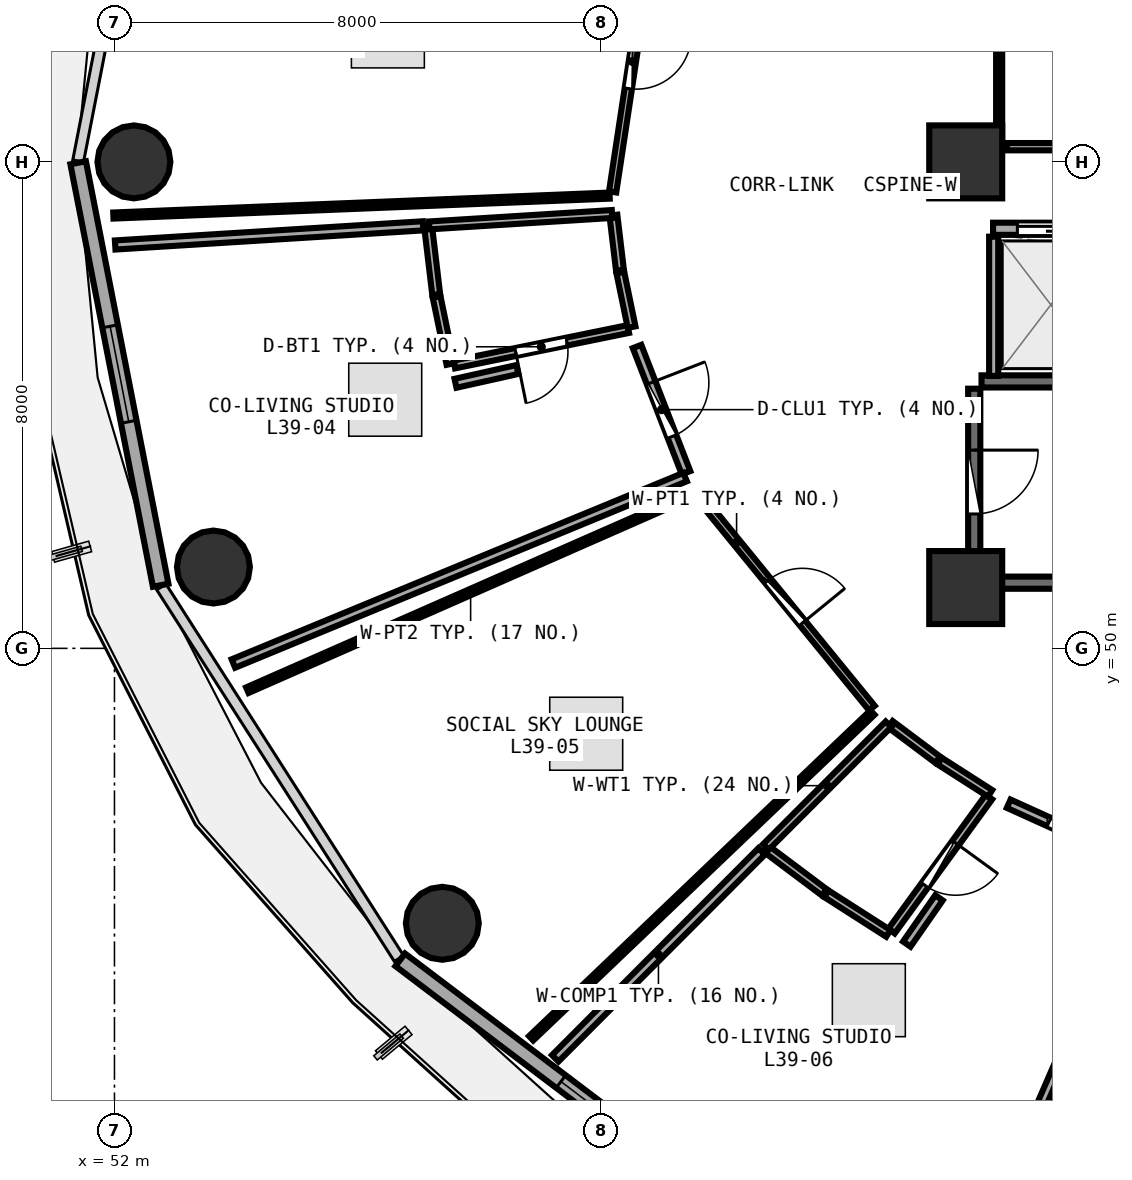
"""IFC4 building model, lengths in metres.
Left out: names, types, materials, properties, quantities, classifications, styles, units other than length and angle.
Written with IfcOpenShell. Run it as: python <this file> out.ifc"""

import sys

from ifc_helpers import new_model, si_unit, direction, frame, frame_2d, origin, origin_2d, place, context, subcontext, project, spatial, rectangle, circle, extrude, element, fill, save


model = new_model("IFC4")
c1 = context("Model", 3, precision=1e-05, world=origin(), true_north=direction((0.0, 1.0)))
c2 = subcontext(c1, "Body", "Model", "MODEL_VIEW")
j1 = project(units=[si_unit("LENGTHUNIT", "METRE"), si_unit("PLANEANGLEUNIT", "RADIAN")], contexts=[c1])
p1 = place(None, origin())
s1 = spatial("IfcSite", under=j1, at=p1, CompositionType="ELEMENT")
p2 = place(p1, origin())
s2 = spatial("IfcBuilding", under=s1, at=p2, CompositionType="ELEMENT")
p3 = place(p2, frame((0.0, 0.0, 154.35)))
s3 = spatial("IfcBuildingStorey", under=s2, at=p3, CompositionType="ELEMENT", Elevation=154.35)
for number, where, z_axis, x_axis in (
    (1, (66.0, 51.0, 0.0), (0.0, 0.0, 1.0), (1.0, 0.0, 0.0)),
    (2, (66.0, 58.0, 0.0), (0.0, 0.0, 1.0), (1.0, 0.0, 0.0)),
):
    element("IfcColumn", number, at=place(p3, frame(where, z_axis=z_axis, x_axis=x_axis)), inside=s3, PredefinedType="PILASTER", context=c2, shape_type="SweptSolid", body=[
        extrude(rectangle(XDim=1.2, YDim=1.2, at=origin_2d()), origin(), (0.0, 0.0, 1.0), 3.75),
    ])
for number, where, z_axis, x_axis in (
    (3, (52.32, 58.0, 0.0), (0.0, 0.0, 1.0), (1.0, 0.0, 0.0)),
    (4, (53.627, 51.337, 0.0), (0.0, 0.0, 1.0), (1.0, 0.0, 0.0)),
    (5, (57.392, 45.479, 0.0), (0.0, 0.0, 1.0), (1.0, 0.0, 0.0)),
):
    element("IfcColumn", number, at=place(p3, frame(where, z_axis=z_axis, x_axis=x_axis)), inside=s3, PredefinedType="COLUMN", context=c2, shape_type="SweptSolid", body=[
        extrude(circle(Radius=0.6, at=origin_2d()), origin(), (0.0, 0.0, 1.0), 3.75),
    ])
p4 = place(p3, frame((51.403, 57.985, 0.0), z_axis=(0.0, 0.0, 1.0), x_axis=(0.191716984769, -0.981450252306, 0.0)))
e6 = element("IfcWall", 6, at=p4, inside=s3, PredefinedType="SOLIDWALL", context=c2, shape_type="SweptSolid", body=[
    extrude(rectangle(XDim=7.079, YDim=0.26, at=frame_2d((3.54, 0.0))), origin(), (0.0, 0.0, 1.0), 3.475),
])
p5 = place(p4, frame((2.74, 0.0, 0.85)))
e7 = element("IfcOpeningElement", 7, at=p5, cuts=e6, PredefinedType="OPENING", context=c2, shape_type="SweptSolid", body=[
    extrude(rectangle(XDim=1.6, YDim=1.45, at=frame_2d((0.8, 0.725))), frame((0.0, 0.14, 0.0), z_axis=(0.0, -1.0, 0.0), x_axis=(1.0, 0.0, 0.0)), (0.0, 0.0, 1.0), 0.28),
])
p6 = place(p3, frame((56.699, 44.878, 0.0), z_axis=(0.0, 0.0, 1.0), x_axis=(0.797163719609, -0.603763202042, 0.0)))
e8 = element("IfcWall", 8, at=p6, inside=s3, PredefinedType="SOLIDWALL", context=c2, shape_type="SweptSolid", body=[
    extrude(rectangle(XDim=7.512, YDim=0.26, at=frame_2d((3.756, 0.0))), origin(), (0.0, 0.0, 1.0), 3.475),
])
p7 = place(p6, frame((3.316, 0.0, 0.85)))
e9 = element("IfcOpeningElement", 9, at=p7, cuts=e8, PredefinedType="OPENING", context=c2, shape_type="SweptSolid", body=[
    extrude(rectangle(XDim=1.6, YDim=1.45, at=frame_2d((0.8, 0.725))), frame((0.0, 0.14, 0.0), z_axis=(0.0, -1.0, 0.0), x_axis=(1.0, 0.0, 0.0)), (0.0, 0.0, 1.0), 0.28),
])
for number, where, z_axis, x_axis in (
    (10, (66.26, 51.08, 0.0), (0.0, 0.0, 1.0), (1.0, 0.0, 0.0)),
    (11, (73.42, 54.39, 0.0), (0.0, 0.0, 1.0), (-1.0, 0.0, 0.0)),
):
    element("IfcWall", number, at=place(p3, frame(where, z_axis=z_axis, x_axis=x_axis)), inside=s3, PredefinedType="SHEAR", context=c2, shape_type="SweptSolid", body=[
        extrude(rectangle(XDim=7.16, YDim=0.2, at=frame_2d((3.58, 0.0))), origin(), (0.0, 0.0, 1.0), 3.49),
    ])
p8 = place(p3, frame((66.14, 54.27, 0.0), z_axis=(0.0, 0.0, 1.0), x_axis=(0.0, -1.0, 0.0)))
e12 = element("IfcWall", 12, at=p8, inside=s3, PredefinedType="SHEAR", context=c2, shape_type="SweptSolid", body=[
    extrude(rectangle(XDim=3.07, YDim=0.2, at=frame_2d((1.535, 0.0))), origin(), (0.0, 0.0, 1.0), 3.49),
])
p9 = place(p8, frame((1.01, 0.0, 0.0)))
e13 = element("IfcOpeningElement", 13, at=p9, cuts=e12, PredefinedType="OPENING", context=c2, shape_type="SweptSolid", body=[
    extrude(rectangle(XDim=1.05, YDim=2.1, at=frame_2d((0.525, 1.05))), frame((0.0, 0.11, 0.0), z_axis=(0.0, -1.0, 0.0), x_axis=(1.0, 0.0, 0.0)), (0.0, 0.0, 1.0), 0.22),
])
p10 = place(p3, frame((66.45, 56.9, 0.0), z_axis=(0.0, 0.0, 1.0), x_axis=(1.0, 0.0, 0.0)))
e14 = element("IfcWall", 14, at=p10, inside=s3, PredefinedType="SOLIDWALL", context=c2, shape_type="SweptSolid", body=[
    extrude(rectangle(XDim=14.4, YDim=0.2, at=frame_2d((7.2, 0.0))), origin(), (0.0, 0.0, 1.0), 3.48),
])
p11 = place(p10, frame((0.4, 0.0, 0.0)))
e15 = element("IfcOpeningElement", 15, at=p11, cuts=e14, PredefinedType="OPENING", context=c2, shape_type="SweptSolid", body=[
    extrude(rectangle(XDim=1.1, YDim=2.1, at=frame_2d((0.55, 1.05))), frame((0.0, 0.11, 0.0), z_axis=(0.0, -1.0, 0.0), x_axis=(1.0, 0.0, 0.0)), (0.0, 0.0, 1.0), 0.22),
])
p12 = place(p10, frame((2.4, 0.0, 0.0)))
e16 = element("IfcOpeningElement", 16, at=p12, cuts=e14, PredefinedType="OPENING", context=c2, shape_type="SweptSolid", body=[
    extrude(rectangle(XDim=1.1, YDim=2.1, at=frame_2d((0.55, 1.05))), frame((0.0, 0.11, 0.0), z_axis=(0.0, -1.0, 0.0), x_axis=(1.0, 0.0, 0.0)), (0.0, 0.0, 1.0), 0.22),
])
p13 = place(p10, frame((4.4, 0.0, 0.0)))
e17 = element("IfcOpeningElement", 17, at=p13, cuts=e14, PredefinedType="OPENING", context=c2, shape_type="SweptSolid", body=[
    extrude(rectangle(XDim=1.1, YDim=2.1, at=frame_2d((0.55, 1.05))), frame((0.0, 0.11, 0.0), z_axis=(0.0, -1.0, 0.0), x_axis=(1.0, 0.0, 0.0)), (0.0, 0.0, 1.0), 0.22),
])
p14 = place(p3, frame((66.46, 54.48, 0.0), z_axis=(0.0, 0.0, 1.0), x_axis=(0.0, 1.0, 0.0)))
e18 = element("IfcWall", 18, at=p14, inside=s3, PredefinedType="PARTITIONING", context=c2, shape_type="SweptSolid", body=[
    extrude(rectangle(XDim=2.29, YDim=0.15, at=frame_2d((1.145, 0.0))), origin(), (0.0, 0.0, 1.0), 3.48),
])
p15 = place(p3, frame((66.675, 58.25, 0.0), z_axis=(0.0, 0.0, 1.0), x_axis=(1.0, 0.0, 0.0)))
e19 = element("IfcWall", 19, at=p15, inside=s3, PredefinedType="PARTITIONING", context=c2, shape_type="SweptSolid", body=[
    extrude(rectangle(XDim=5.715, YDim=0.12, at=frame_2d((2.857, 0.0))), origin(), (0.0, 0.0, 1.0), 3.48),
])
p16 = place(p15, frame((2.407, 0.0, 0.0)))
e20 = element("IfcOpeningElement", 20, at=p16, cuts=e19, PredefinedType="OPENING", context=c2, shape_type="SweptSolid", body=[
    extrude(rectangle(XDim=0.9, YDim=2.08, at=frame_2d((0.45, 1.04))), frame((0.0, 0.07, 0.0), z_axis=(0.0, -1.0, 0.0), x_axis=(1.0, 0.0, 0.0)), (0.0, 0.0, 1.0), 0.14),
])
p17 = place(p3, frame((60.843, 61.796, 0.0), z_axis=(0.0, 0.0, 1.0), x_axis=(-0.149807046494, -0.988715251638, 0.0)))
e21 = element("IfcWall", 21, at=p17, inside=s3, PredefinedType="PARTITIONING", context=c2, shape_type="SweptSolid", body=[
    extrude(rectangle(XDim=4.338, YDim=0.12, at=frame_2d((2.169, 0.0))), origin(), (0.0, 0.0, 1.0), 2.975),
])
p18 = place(p17, frame((1.719, 0.0, 0.0)))
e22 = element("IfcOpeningElement", 22, at=p18, cuts=e21, PredefinedType="OPENING", context=c2, shape_type="SweptSolid", body=[
    extrude(rectangle(XDim=0.9, YDim=2.08, at=frame_2d((0.45, 1.04))), frame((0.0, 0.07, 0.0), z_axis=(0.0, -1.0, 0.0), x_axis=(1.0, 0.0, 0.0)), (0.0, 0.0, 1.0), 0.14),
])
p19 = place(p3, frame((60.45, 55.251, 0.0), z_axis=(0.0, 0.0, 1.0), x_axis=(-0.979866857251, -0.199652052484, 0.0)))
e23 = element("IfcWall", 23, at=p19, inside=s3, PredefinedType="PLUMBINGWALL", context=c2, shape_type="SweptSolid", body=[
    extrude(rectangle(XDim=2.92, YDim=0.13, at=frame_2d((1.46, 0.0))), origin(), (0.0, 0.0, 1.0), 3.175),
])
p20 = place(p19, frame((1.03, 0.0, 0.0)))
e24 = element("IfcOpeningElement", 24, at=p20, cuts=e23, PredefinedType="OPENING", context=c2, shape_type="SweptSolid", body=[
    extrude(rectangle(XDim=0.86, YDim=2.05, at=frame_2d((0.43, 1.025))), frame((0.0, 0.075, 0.0), z_axis=(0.0, -1.0, 0.0), x_axis=(1.0, 0.0, 0.0)), (0.0, 0.0, 1.0), 0.15),
])
p21 = place(p3, frame((60.595, 54.964, 0.0), z_axis=(0.0, 0.0, 1.0), x_axis=(0.361769005858, -0.932267765398, 0.0)))
e25 = element("IfcWall", 25, at=p21, inside=s3, PredefinedType="PARTITIONING", context=c2, shape_type="SweptSolid", body=[
    extrude(rectangle(XDim=2.227, YDim=0.15, at=frame_2d((1.114, 0.0))), origin(), (0.0, 0.0, 1.0), 3.235),
])
p22 = place(p21, frame((0.639, 0.0, 0.0)))
e26 = element("IfcOpeningElement", 26, at=p22, cuts=e25, PredefinedType="OPENING", context=c2, shape_type="SweptSolid", body=[
    extrude(rectangle(XDim=0.95, YDim=2.08, at=frame_2d((0.475, 1.04))), frame((0.0, 0.085, 0.0), z_axis=(0.0, -1.0, 0.0), x_axis=(1.0, 0.0, 0.0)), (0.0, 0.0, 1.0), 0.17),
])
p23 = place(p3, frame((61.604, 52.511, 0.0), z_axis=(0.0, 0.0, 1.0), x_axis=(0.632491819148, -0.77456703952, 0.0)))
e27 = element("IfcWall", 27, at=p23, inside=s3, PredefinedType="PARTITIONING", context=c2, shape_type="SweptSolid", body=[
    extrude(rectangle(XDim=4.511, YDim=0.12, at=frame_2d((2.255, 0.0))), origin(), (0.0, 0.0, 1.0), 2.975),
])
p24 = place(p23, frame((1.805, 0.0, 0.0)))
e28 = element("IfcOpeningElement", 28, at=p24, cuts=e27, PredefinedType="OPENING", context=c2, shape_type="SweptSolid", body=[
    extrude(rectangle(XDim=0.9, YDim=2.08, at=frame_2d((0.45, 1.04))), frame((0.0, 0.07, 0.0), z_axis=(0.0, -1.0, 0.0), x_axis=(1.0, 0.0, 0.0)), (0.0, 0.0, 1.0), 0.14),
])
p25 = place(p3, frame((66.383, 47.555, 0.0), z_axis=(0.0, 0.0, 1.0), x_axis=(-0.588001344837, -0.808859949849, 0.0)))
e29 = element("IfcWall", 29, at=p25, inside=s3, PredefinedType="PLUMBINGWALL", context=c2, shape_type="SweptSolid", body=[
    extrude(rectangle(XDim=2.727, YDim=0.13, at=frame_2d((1.364, 0.0))), origin(), (0.0, 0.0, 1.0), 3.235),
])
p26 = place(p25, frame((0.934, 0.0, 0.0)))
e30 = element("IfcOpeningElement", 30, at=p26, cuts=e29, PredefinedType="OPENING", context=c2, shape_type="SweptSolid", body=[
    extrude(rectangle(XDim=0.86, YDim=2.05, at=frame_2d((0.43, 1.025))), frame((0.0, 0.075, 0.0), z_axis=(0.0, -1.0, 0.0), x_axis=(1.0, 0.0, 0.0)), (0.0, 0.0, 1.0), 0.15),
])
p27 = place(p3, frame((66.707, 47.445, 0.0), z_axis=(0.0, 0.0, 1.0), x_axis=(0.910872904928, -0.412686989216, 0.0)))
e31 = element("IfcWall", 31, at=p27, inside=s3, PredefinedType="PARTITIONING", context=c2, shape_type="SweptSolid", body=[
    extrude(rectangle(XDim=2.407, YDim=0.15, at=frame_2d((1.204, 0.0))), origin(), (0.0, 0.0, 1.0), 3.235),
])
p28 = place(p27, frame((0.729, 0.0, 0.0)))
e32 = element("IfcOpeningElement", 32, at=p28, cuts=e31, PredefinedType="OPENING", context=c2, shape_type="SweptSolid", body=[
    extrude(rectangle(XDim=0.95, YDim=2.08, at=frame_2d((0.475, 1.04))), frame((0.0, 0.085, 0.0), z_axis=(0.0, -1.0, 0.0), x_axis=(1.0, 0.0, 0.0)), (0.0, 0.0, 1.0), 0.17),
])
p29 = place(p3, frame((66.55, 60.68, 0.0), z_axis=(0.0, 0.0, 1.0), x_axis=(0.0, -1.0, 0.0)))
e33 = element("IfcWall", 33, at=p29, inside=s3, PredefinedType="PARTITIONING", context=c2, shape_type="SweptSolid", body=[
    extrude(rectangle(XDim=2.383, YDim=0.1, at=frame_2d((1.191, 0.0))), origin(), (0.0, 0.0, 1.0), 3.48),
])
p30 = place(p3, frame((66.645, 39.297, 0.0), z_axis=(0.0, 0.0, 1.0), x_axis=(0.364957999702, 0.931023983823, 0.0)))
e34 = element("IfcWall", 34, at=p30, inside=s3, PredefinedType="PARTITIONING", context=c2, shape_type="SweptSolid", body=[
    extrude(rectangle(XDim=7.464, YDim=0.1, at=frame_2d((3.732, 0.0))), origin(), (0.0, 0.0, 1.0), 3.025),
])
p31 = place(p3, frame((60.144, 57.445, 0.0), z_axis=(0.0, 0.0, 1.0), x_axis=(-0.99919531507, -0.040108881097, 0.0)))
e35 = element("IfcWall", 35, at=p31, inside=s3, PredefinedType="PARTITIONING", context=c2, shape_type="SweptSolid", body=[
    extrude(rectangle(XDim=8.169, YDim=0.1, at=frame_2d((4.084, 0.0))), origin(), (0.0, 0.0, 1.0), 3.025),
])
p32 = place(p3, frame((60.205, 57.124, 0.0), z_axis=(0.0, 0.0, 1.0), x_axis=(0.118797046487, -0.992918557459, 0.0)))
e36 = element("IfcWall", 36, at=p32, inside=s3, PredefinedType="PLUMBINGWALL", context=c2, shape_type="SweptSolid", body=[
    extrude(rectangle(XDim=0.912, YDim=0.13, at=frame_2d((0.456, 0.0))), origin(), (0.0, 0.0, 1.0), 3.48),
])
p33 = place(p3, frame((60.32, 56.178, 0.0), z_axis=(0.0, 0.0, 1.0), x_axis=(0.202067144879, -0.979371670491, 0.0)))
e37 = element("IfcWall", 37, at=p33, inside=s3, PredefinedType="PLUMBINGWALL", context=c2, shape_type="SweptSolid", body=[
    extrude(rectangle(XDim=0.915, YDim=0.13, at=frame_2d((0.457, 0.0))), origin(), (0.0, 0.0, 1.0), 3.48),
])
p34 = place(p3, frame((57.526, 54.676, 0.0), z_axis=(0.0, 0.0, 1.0), x_axis=(-0.202111317069, 0.979362555703, 0.0)))
e38 = element("IfcWall", 38, at=p34, inside=s3, PredefinedType="PLUMBINGWALL", context=c2, shape_type="SweptSolid", body=[
    extrude(rectangle(XDim=1.127, YDim=0.13, at=frame_2d((0.563, 0.0))), origin(), (0.0, 0.0, 1.0), 3.48),
])
p35 = place(p3, frame((57.292, 55.819, 0.0), z_axis=(0.0, 0.0, 1.0), x_axis=(-0.11846804652, 0.992957865145, 0.0)))
e39 = element("IfcWall", 39, at=p35, inside=s3, PredefinedType="PLUMBINGWALL", context=c2, shape_type="SweptSolid", body=[
    extrude(rectangle(XDim=1.123, YDim=0.13, at=frame_2d((0.562, 0.0))), origin(), (0.0, 0.0, 1.0), 3.48),
])
p36 = place(p3, frame((57.176, 56.955, 0.0), z_axis=(0.0, 0.0, 1.0), x_axis=(0.998056675164, 0.062312704652, 0.0)))
e40 = element("IfcWall", 40, at=p36, inside=s3, PredefinedType="PLUMBINGWALL", context=c2, shape_type="SweptSolid", body=[
    extrude(rectangle(XDim=3.013, YDim=0.13, at=frame_2d((1.506, 0.0))), origin(), (0.0, 0.0, 1.0), 3.175),
])
p37 = place(p3, frame((61.385, 52.817, 0.0), z_axis=(0.0, 0.0, 1.0), x_axis=(-0.924352507704, -0.381539567412, 0.0)))
e41 = element("IfcWall", 41, at=p37, inside=s3, PredefinedType="PARTITIONING", context=c2, shape_type="SweptSolid", body=[
    extrude(rectangle(XDim=8.037, YDim=0.15, at=frame_2d((4.019, 0.0))), origin(), (0.0, 0.0, 1.0), 2.975),
])
p38 = place(p3, frame((52.012, 56.634, 0.0), z_axis=(0.0, 0.0, 1.0), x_axis=(0.998071814667, 0.062069741162, 0.0)))
e42 = element("IfcWall", 42, at=p38, inside=s3, PredefinedType="PARTITIONING", context=c2, shape_type="SweptSolid", body=[
    extrude(rectangle(XDim=5.074, YDim=0.15, at=frame_2d((2.537, 0.0))), origin(), (0.0, 0.0, 1.0), 3.025),
])
p39 = place(p3, frame((57.609, 54.359, 0.0), z_axis=(0.0, 0.0, 1.0), x_axis=(0.97598825513, 0.217823152693, 0.0)))
e43 = element("IfcWall", 43, at=p39, inside=s3, PredefinedType="PARTITIONING", context=c2, shape_type="SweptSolid", body=[
    extrude(rectangle(XDim=1.042, YDim=0.15, at=frame_2d((0.521, 0.0))), origin(), (0.0, 0.0, 1.0), 3.175),
])
p40 = place(p3, frame((64.466, 48.943, 0.0), z_axis=(0.0, 0.0, 1.0), x_axis=(-0.723511266615, -0.690312572014, 0.0)))
e44 = element("IfcWall", 44, at=p40, inside=s3, PredefinedType="PARTITIONING", context=c2, shape_type="SweptSolid", body=[
    extrude(rectangle(XDim=7.758, YDim=0.1, at=frame_2d((3.879, 0.0))), origin(), (0.0, 0.0, 1.0), 3.025),
])
p41 = place(p3, frame((54.186, 49.312, 0.0), z_axis=(0.0, 0.0, 1.0), x_axis=(0.915373356269, 0.402606034024, 0.0)))
e45 = element("IfcWall", 45, at=p41, inside=s3, PredefinedType="PARTITIONING", context=c2, shape_type="SweptSolid", body=[
    extrude(rectangle(XDim=8.023, YDim=0.1, at=frame_2d((4.011, 0.0))), origin(), (0.0, 0.0, 1.0), 2.975),
])
p42 = place(p3, frame((64.759, 48.753, 0.0), z_axis=(0.0, 0.0, 1.0), x_axis=(0.800390142897, -0.599479456824, 0.0)))
e46 = element("IfcWall", 46, at=p42, inside=s3, PredefinedType="PLUMBINGWALL", context=c2, shape_type="SweptSolid", body=[
    extrude(rectangle(XDim=0.976, YDim=0.13, at=frame_2d((0.488, 0.0))), origin(), (0.0, 0.0, 1.0), 2.975),
])
p43 = place(p3, frame((65.573, 48.145, 0.0), z_axis=(0.0, 0.0, 1.0), x_axis=(0.842104586495, -0.539314254776, 0.0)))
e47 = element("IfcWall", 47, at=p43, inside=s3, PredefinedType="PLUMBINGWALL", context=c2, shape_type="SweptSolid", body=[
    extrude(rectangle(XDim=0.984, YDim=0.13, at=frame_2d((0.492, 0.0))), origin(), (0.0, 0.0, 1.0), 3.48),
])
p44 = place(p3, frame((64.727, 45.312, 0.0), z_axis=(0.0, 0.0, 1.0), x_axis=(-0.842330007588, 0.538962112135, 0.0)))
e48 = element("IfcWall", 48, at=p44, inside=s3, PredefinedType="PLUMBINGWALL", context=c2, shape_type="SweptSolid", body=[
    extrude(rectangle(XDim=1.21, YDim=0.13, at=frame_2d((0.605, 0.0))), origin(), (0.0, 0.0, 1.0), 2.975),
])
p45 = place(p3, frame((63.675, 45.987, 0.0), z_axis=(0.0, 0.0, 1.0), x_axis=(-0.8, 0.6, 0.0)))
e49 = element("IfcWall", 49, at=p45, inside=s3, PredefinedType="PLUMBINGWALL", context=c2, shape_type="SweptSolid", body=[
    extrude(rectangle(XDim=1.2, YDim=0.13, at=frame_2d((0.6, 0.0))), origin(), (0.0, 0.0, 1.0), 3.48),
])
p46 = place(p3, frame((62.713, 46.733, 0.0), z_axis=(0.0, 0.0, 1.0), x_axis=(0.706764315195, 0.707449081396, 0.0)))
e50 = element("IfcWall", 50, at=p46, inside=s3, PredefinedType="PLUMBINGWALL", context=c2, shape_type="SweptSolid", body=[
    extrude(rectangle(XDim=2.852, YDim=0.13, at=frame_2d((1.426, 0.0))), origin(), (0.0, 0.0, 1.0), 3.235),
])
p47 = place(p3, frame((68.938, 46.39, 0.0), z_axis=(0.0, 0.0, 1.0), x_axis=(-0.398074464123, -0.917353105959, 0.0)))
e51 = element("IfcWall", 51, at=p47, inside=s3, PredefinedType="PARTITIONING", context=c2, shape_type="SweptSolid", body=[
    extrude(rectangle(XDim=7.481, YDim=0.15, at=frame_2d((3.741, 0.0))), origin(), (0.0, 0.0, 1.0), 3.025),
])
p48 = place(p3, frame((59.249, 43.258, 0.0), z_axis=(0.0, 0.0, 1.0), x_axis=(0.706293548202, 0.707919079958, 0.0)))
e52 = element("IfcWall", 52, at=p48, inside=s3, PredefinedType="PARTITIONING", context=c2, shape_type="SweptSolid", body=[
    extrude(rectangle(XDim=4.806, YDim=0.15, at=frame_2d((2.403, 0.0))), origin(), (0.0, 0.0, 1.0), 3.025),
])
p49 = place(p3, frame((65.031, 45.136, 0.0), z_axis=(0.0, 0.0, 1.0), x_axis=(0.570563407037, 0.821253553143, 0.0)))
e53 = element("IfcWall", 53, at=p49, inside=s3, PredefinedType="PARTITIONING", context=c2, shape_type="SweptSolid", body=[
    extrude(rectangle(XDim=0.928, YDim=0.15, at=frame_2d((0.464, 0.0))), origin(), (0.0, 0.0, 1.0), 3.48),
])
p50 = place(p5, origin())
e54 = element("IfcWindow", 54, at=p50, inside=s3, PartitioningType="SINGLE_PANEL", PredefinedType="WINDOW", context=c2, shape_type="SweptSolid", body=[
    extrude(rectangle(XDim=1.6, YDim=1.45, at=frame_2d((0.8, 0.725))), frame((0.0, 0.03, 0.0), z_axis=(0.0, -1.0, 0.0), x_axis=(1.0, 0.0, 0.0)), (0.0, 0.0, 1.0), 0.06),
])
fill(e7, e54)
p51 = place(p7, origin())
e55 = element("IfcWindow", 55, at=p51, inside=s3, PartitioningType="SINGLE_PANEL", PredefinedType="WINDOW", context=c2, shape_type="SweptSolid", body=[
    extrude(rectangle(XDim=1.6, YDim=1.45, at=frame_2d((0.8, 0.725))), frame((0.0, 0.03, 0.0), z_axis=(0.0, -1.0, 0.0), x_axis=(1.0, 0.0, 0.0)), (0.0, 0.0, 1.0), 0.06),
])
fill(e9, e55)
p52 = place(p9, origin())
e56 = element("IfcDoor", 56, at=p52, inside=s3, OperationType="SINGLE_SWING_LEFT", PredefinedType="DOOR", context=c2, shape_type="SweptSolid", body=[
    extrude(rectangle(XDim=1.05, YDim=2.1, at=frame_2d((0.525, 1.05))), frame((0.0, 0.025, 0.0), z_axis=(0.0, -1.0, 0.0), x_axis=(1.0, 0.0, 0.0)), (0.0, 0.0, 1.0), 0.05),
])
fill(e13, e56)
p53 = place(p11, origin())
e57 = element("IfcDoor", 57, at=p53, inside=s3, OperationType="DOUBLE_DOOR_SLIDING", PredefinedType="DOOR", context=c2, shape_type="SweptSolid", body=[
    extrude(rectangle(XDim=1.1, YDim=2.1, at=frame_2d((0.55, 1.05))), frame((0.0, 0.025, 0.0), z_axis=(0.0, -1.0, 0.0), x_axis=(1.0, 0.0, 0.0)), (0.0, 0.0, 1.0), 0.05),
])
fill(e15, e57)
p54 = place(p18, origin())
e58 = element("IfcDoor", 58, at=p54, inside=s3, OperationType="SINGLE_SWING_LEFT", PredefinedType="DOOR", context=c2, shape_type="SweptSolid", body=[
    extrude(rectangle(XDim=0.9, YDim=2.08, at=frame_2d((0.45, 1.04))), frame((0.0, 0.025, 0.0), z_axis=(0.0, -1.0, 0.0), x_axis=(1.0, 0.0, 0.0)), (0.0, 0.0, 1.0), 0.05),
])
fill(e22, e58)
p55 = place(p20, origin())
e59 = element("IfcDoor", 59, at=p55, inside=s3, OperationType="SINGLE_SWING_RIGHT", PredefinedType="DOOR", context=c2, shape_type="SweptSolid", body=[
    extrude(rectangle(XDim=0.86, YDim=2.05, at=frame_2d((0.43, 1.025))), frame((0.0, 0.025, 0.0), z_axis=(0.0, -1.0, 0.0), x_axis=(1.0, 0.0, 0.0)), (0.0, 0.0, 1.0), 0.05),
])
fill(e24, e59)
p56 = place(p22, origin())
e60 = element("IfcDoor", 60, at=p56, inside=s3, OperationType="SINGLE_SWING_LEFT", PredefinedType="DOOR", context=c2, shape_type="SweptSolid", body=[
    extrude(rectangle(XDim=0.95, YDim=2.08, at=frame_2d((0.475, 1.04))), frame((0.0, 0.025, 0.0), z_axis=(0.0, -1.0, 0.0), x_axis=(1.0, 0.0, 0.0)), (0.0, 0.0, 1.0), 0.05),
])
fill(e26, e60)
p57 = place(p24, origin())
e61 = element("IfcDoor", 61, at=p57, inside=s3, OperationType="SINGLE_SWING_RIGHT", PredefinedType="DOOR", context=c2, shape_type="SweptSolid", body=[
    extrude(rectangle(XDim=0.9, YDim=2.08, at=frame_2d((0.45, 1.04))), frame((0.0, 0.025, 0.0), z_axis=(0.0, -1.0, 0.0), x_axis=(1.0, 0.0, 0.0)), (0.0, 0.0, 1.0), 0.05),
])
fill(e28, e61)
p58 = place(p26, origin())
e62 = element("IfcDoor", 62, at=p58, inside=s3, OperationType="SINGLE_SWING_LEFT", PredefinedType="DOOR", context=c2, shape_type="SweptSolid", body=[
    extrude(rectangle(XDim=0.86, YDim=2.05, at=frame_2d((0.43, 1.025))), frame((0.0, 0.025, 0.0), z_axis=(0.0, -1.0, 0.0), x_axis=(1.0, 0.0, 0.0)), (0.0, 0.0, 1.0), 0.05),
])
fill(e30, e62)
p59 = place(p28, origin())
e63 = element("IfcDoor", 63, at=p59, inside=s3, OperationType="SINGLE_SWING_RIGHT", PredefinedType="DOOR", context=c2, shape_type="SweptSolid", body=[
    extrude(rectangle(XDim=0.95, YDim=2.08, at=frame_2d((0.475, 1.04))), frame((0.0, 0.025, 0.0), z_axis=(0.0, -1.0, 0.0), x_axis=(1.0, 0.0, 0.0)), (0.0, 0.0, 1.0), 0.05),
])
fill(e32, e63)
save(model, sys.argv[1])
